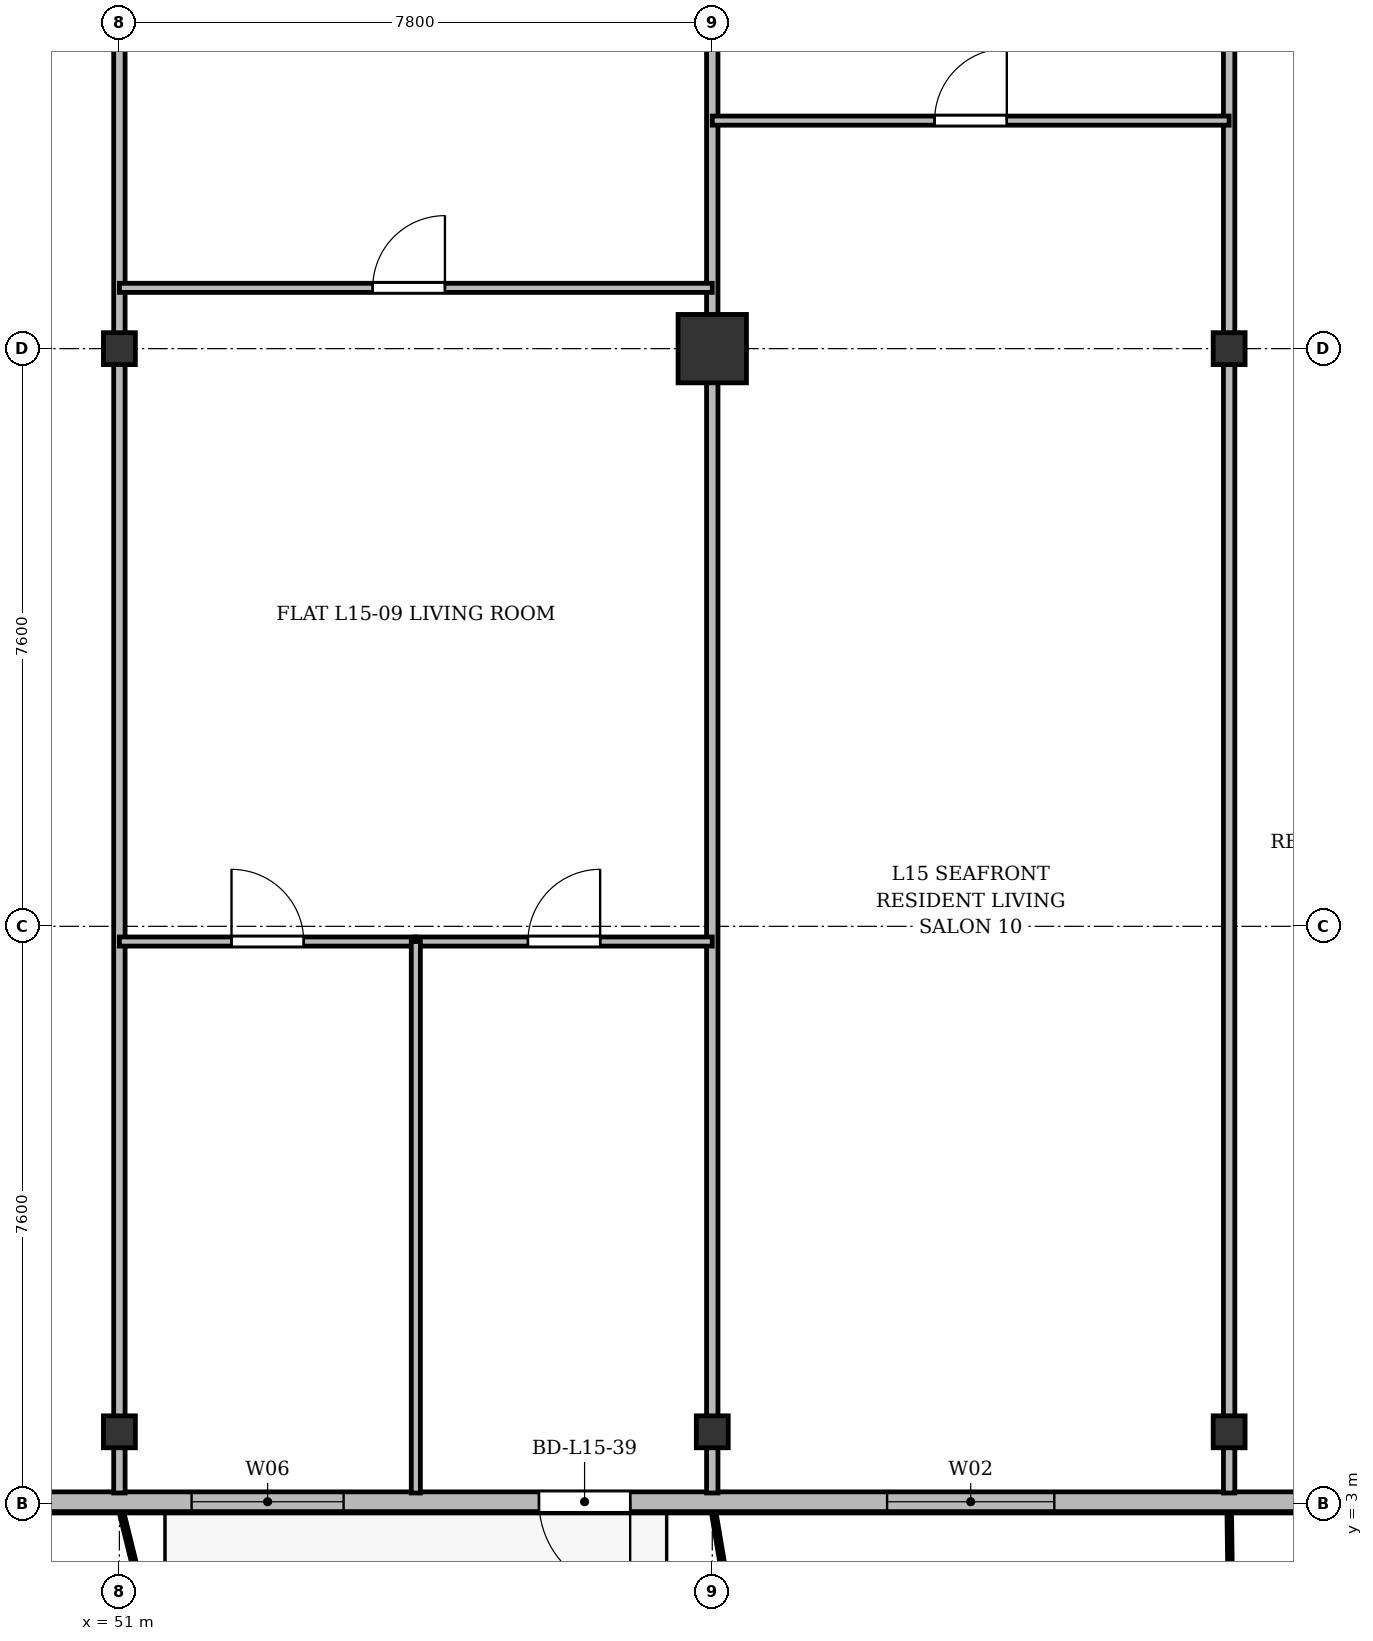
"""IFC4 building model, lengths in metres.
Left out: names, types, materials, properties, quantities, classifications, styles, units other than length and angle.
Written with IfcOpenShell. Run it as: python <this file> out.ifc"""

import sys

from ifc_helpers import new_model, si_unit, direction, frame, frame_2d, origin, origin_2d, place, context, subcontext, project, spatial, rectangle, i_section, extrude, source, transform, mapped, element, fill, save


model = new_model("IFC4")
c1 = context("Model", 3, precision=1e-05, world=origin(), true_north=direction((0.0, 1.0)))
c2 = subcontext(c1, "Body", "Model", "MODEL_VIEW")
j1 = project(units=[si_unit("LENGTHUNIT", "METRE"), si_unit("PLANEANGLEUNIT", "RADIAN")], contexts=[c1])
p1 = place(None, origin())
s1 = spatial("IfcSite", under=j1, at=p1, CompositionType="ELEMENT")
p2 = place(p1, origin())
s2 = spatial("IfcBuilding", under=s1, at=p2, CompositionType="ELEMENT")
p3 = place(p2, frame((0.0, 0.0, 59.5)))
s3 = spatial("IfcBuildingStorey", under=s2, at=p3, CompositionType="ELEMENT", Elevation=59.5)
m1 = source(origin(), c2, "Body", "SweptSolid", [
    extrude(i_section(OverallWidth=0.42, OverallDepth=0.42, WebThickness=0.026, FlangeThickness=0.04, at=origin_2d()), origin(), (0.0, 0.0, 1.0), 3.6),
])
for number, where, z_axis, x_axis in (
    (1, (51.0, 3.95, 0.0), (0.0, 0.0, 1.0), (1.0, 0.0, 0.0)),
    (2, (51.0, 18.2, 0.0), (0.0, 0.0, 1.0), (1.0, 0.0, 0.0)),
    (3, (58.8, 3.95, 0.0), (0.0, 0.0, 1.0), (1.0, 0.0, 0.0)),
):
    element("IfcColumn", number, at=place(p3, frame(where, z_axis=z_axis, x_axis=x_axis)), inside=s3, PredefinedType="COLUMN", context=c2, shape_type="MappedRepresentation", body=[
        mapped(m1, transform((0.0, 0.0, 0.0), x_axis=(1.0, 0.0, 0.0), y_axis=(0.0, 1.0, 0.0), z_axis=(0.0, 0.0, 1.0), scale=1.0)),
    ])
m2 = source(origin(), c2, "Body", "SweptSolid", [
    extrude(rectangle(XDim=0.9, YDim=0.9, at=origin_2d()), origin(), (0.0, 0.0, 1.0), 3.6),
])
p4 = place(p3, frame((58.8, 18.2, 0.0), z_axis=(0.0, 0.0, 1.0), x_axis=(1.0, 0.0, 0.0)))
e4 = element("IfcColumn", 4, at=p4, inside=s3, PredefinedType="COLUMN", context=c2, shape_type="MappedRepresentation", body=[
    mapped(m2, transform((0.0, 0.0, 0.0), x_axis=(1.0, 0.0, 0.0), y_axis=(0.0, 1.0, 0.0), z_axis=(0.0, 0.0, 1.0), scale=1.0)),
])
for number, where, z_axis, x_axis in (
    (5, (65.6, 3.95, 0.0), (0.0, 0.0, 1.0), (1.0, 0.0, 0.0)),
    (6, (65.6, 18.2, 0.0), (0.0, 0.0, 1.0), (1.0, 0.0, 0.0)),
):
    element("IfcColumn", number, at=place(p3, frame(where, z_axis=z_axis, x_axis=x_axis)), inside=s3, PredefinedType="COLUMN", context=c2, shape_type="MappedRepresentation", body=[
        mapped(m1, transform((0.0, 0.0, 0.0), x_axis=(1.0, 0.0, 0.0), y_axis=(0.0, 1.0, 0.0), z_axis=(0.0, 0.0, 1.0), scale=1.0)),
    ])
p5 = place(p3, frame((66.9, 3.03, 0.0), z_axis=(0.0, 0.0, 1.0), x_axis=(-1.0, 0.0, 0.0)))
e7 = element("IfcWall", 7, at=p5, inside=s3, PredefinedType="SOLIDWALL", context=c2, shape_type="SweptSolid", body=[
    extrude(rectangle(XDim=59.4, YDim=0.26, at=frame_2d((29.7, 0.0))), origin(), (0.0, 0.0, 1.0), 3.34),
])
p6 = place(p5, frame((3.6, 0.0, 0.9)))
e8 = element("IfcOpeningElement", 8, at=p6, cuts=e7, PredefinedType="OPENING", context=c2, shape_type="SweptSolid", body=[
    extrude(rectangle(XDim=2.2, YDim=1.8, at=frame_2d((1.1, 0.9))), frame((0.0, 0.14, 0.0), z_axis=(0.0, -1.0, 0.0), x_axis=(1.0, 0.0, 0.0)), (0.0, 0.0, 1.0), 0.28),
])
p7 = place(p5, frame((9.18, 0.0, 0.0)))
e9 = element("IfcOpeningElement", 9, at=p7, cuts=e7, PredefinedType="OPENING", context=c2, shape_type="SweptSolid", body=[
    extrude(rectangle(XDim=1.2, YDim=2.2, at=frame_2d((0.6, 1.1))), frame((0.0, 0.14, 0.0), z_axis=(0.0, -1.0, 0.0), x_axis=(1.0, 0.0, 0.0)), (0.0, 0.0, 1.0), 0.28),
])
p8 = place(p5, frame((12.95, 0.0, 0.9)))
e10 = element("IfcOpeningElement", 10, at=p8, cuts=e7, PredefinedType="OPENING", context=c2, shape_type="SweptSolid", body=[
    extrude(rectangle(XDim=2.0, YDim=1.95, at=frame_2d((1.0, 0.975))), frame((0.0, 0.14, 0.0), z_axis=(0.0, -1.0, 0.0), x_axis=(1.0, 0.0, 0.0)), (0.0, 0.0, 1.0), 0.28),
])
p9 = place(p5, frame((18.675, 0.0, 0.9)))
e11 = element("IfcOpeningElement", 11, at=p9, cuts=e7, PredefinedType="OPENING", context=c2, shape_type="SweptSolid", body=[
    extrude(rectangle(XDim=1.65, YDim=1.85, at=frame_2d((0.825, 0.925))), frame((0.0, 0.14, 0.0), z_axis=(0.0, -1.0, 0.0), x_axis=(1.0, 0.0, 0.0)), (0.0, 0.0, 1.0), 0.28),
])
p10 = place(p5, frame((24.1, 0.0, 0.9)))
e12 = element("IfcOpeningElement", 12, at=p10, cuts=e7, PredefinedType="OPENING", context=c2, shape_type="SweptSolid", body=[
    extrude(rectangle(XDim=1.8, YDim=1.8, at=frame_2d((0.9, 0.9))), frame((0.0, 0.14, 0.0), z_axis=(0.0, -1.0, 0.0), x_axis=(1.0, 0.0, 0.0)), (0.0, 0.0, 1.0), 0.28),
])
p11 = place(p5, frame((28.1, 0.0, 0.9)))
e13 = element("IfcOpeningElement", 13, at=p11, cuts=e7, PredefinedType="OPENING", context=c2, shape_type="SweptSolid", body=[
    extrude(rectangle(XDim=2.2, YDim=1.8, at=frame_2d((1.1, 0.9))), frame((0.0, 0.14, 0.0), z_axis=(0.0, -1.0, 0.0), x_axis=(1.0, 0.0, 0.0)), (0.0, 0.0, 1.0), 0.28),
])
p12 = place(p5, frame((33.15, 0.0, 0.9)))
e14 = element("IfcOpeningElement", 14, at=p12, cuts=e7, PredefinedType="OPENING", context=c2, shape_type="SweptSolid", body=[
    extrude(rectangle(XDim=1.5, YDim=1.75, at=frame_2d((0.75, 0.875))), frame((0.0, 0.14, 0.0), z_axis=(0.0, -1.0, 0.0), x_axis=(1.0, 0.0, 0.0)), (0.0, 0.0, 1.0), 0.28),
])
p13 = place(p5, frame((40.301, 0.0, 0.0)))
e15 = element("IfcOpeningElement", 15, at=p13, cuts=e7, PredefinedType="OPENING", context=c2, shape_type="SweptSolid", body=[
    extrude(rectangle(XDim=1.2, YDim=2.2, at=frame_2d((0.6, 1.1))), frame((0.0, 0.14, 0.0), z_axis=(0.0, -1.0, 0.0), x_axis=(1.0, 0.0, 0.0)), (0.0, 0.0, 1.0), 0.28),
])
p14 = place(p5, frame((46.575, 0.0, 0.9)))
e16 = element("IfcOpeningElement", 16, at=p14, cuts=e7, PredefinedType="OPENING", context=c2, shape_type="SweptSolid", body=[
    extrude(rectangle(XDim=1.65, YDim=1.85, at=frame_2d((0.825, 0.925))), frame((0.0, 0.14, 0.0), z_axis=(0.0, -1.0, 0.0), x_axis=(1.0, 0.0, 0.0)), (0.0, 0.0, 1.0), 0.28),
])
p15 = place(p5, frame((53.136, 0.0, 0.0)))
e17 = element("IfcOpeningElement", 17, at=p15, cuts=e7, PredefinedType="OPENING", context=c2, shape_type="SweptSolid", body=[
    extrude(rectangle(XDim=1.2, YDim=2.2, at=frame_2d((0.6, 1.1))), frame((0.0, 0.14, 0.0), z_axis=(0.0, -1.0, 0.0), x_axis=(1.0, 0.0, 0.0)), (0.0, 0.0, 1.0), 0.28),
])
p16 = place(p5, frame((55.3, 0.0, 0.9)))
e18 = element("IfcOpeningElement", 18, at=p16, cuts=e7, PredefinedType="OPENING", context=c2, shape_type="SweptSolid", body=[
    extrude(rectangle(XDim=2.2, YDim=1.8, at=frame_2d((1.1, 0.9))), frame((0.0, 0.14, 0.0), z_axis=(0.0, -1.0, 0.0), x_axis=(1.0, 0.0, 0.0)), (0.0, 0.0, 1.0), 0.28),
])
for number, where, z_axis, x_axis in (
    (19, (51.0, 3.145, 0.0), (0.0, 0.0, 1.0), (0.0, 1.0, 0.0)),
    (20, (58.8, 3.145, 0.0), (0.0, 0.0, 1.0), (0.0, 1.0, 0.0)),
    (21, (65.6, 3.145, 0.0), (0.0, 0.0, 1.0), (0.0, 1.0, 0.0)),
):
    element("IfcWall", number, at=place(p3, frame(where, z_axis=z_axis, x_axis=x_axis)), inside=s3, PredefinedType="PARTITIONING", context=c2, shape_type="SweptSolid", body=[
        extrude(rectangle(XDim=24.455, YDim=0.15, at=frame_2d((12.228, 0.0))), origin(), (0.0, 0.0, 1.0), 2.752),
    ])
p17 = place(p3, frame((51.0, 19.0, 0.0), z_axis=(0.0, 0.0, 1.0), x_axis=(1.0, 0.0, 0.0)))
e22 = element("IfcWall", 22, at=p17, inside=s3, PredefinedType="PARTITIONING", context=c2, shape_type="SweptSolid", body=[
    extrude(rectangle(XDim=7.8, YDim=0.12, at=frame_2d((3.9, 0.0))), origin(), (0.0, 0.0, 1.0), 2.752),
])
p18 = place(p17, frame((3.333, 0.0, 0.0)))
e23 = element("IfcOpeningElement", 23, at=p18, cuts=e22, PredefinedType="OPENING", context=c2, shape_type="SweptSolid", body=[
    extrude(rectangle(XDim=0.95, YDim=2.15, at=frame_2d((0.475, 1.075))), frame((0.0, 0.07, 0.0), z_axis=(0.0, -1.0, 0.0), x_axis=(1.0, 0.0, 0.0)), (0.0, 0.0, 1.0), 0.14),
])
p19 = place(p3, frame((51.0, 10.4, 0.0), z_axis=(0.0, 0.0, 1.0), x_axis=(1.0, 0.0, 0.0)))
e24 = element("IfcWall", 24, at=p19, inside=s3, PredefinedType="PARTITIONING", context=c2, shape_type="SweptSolid", body=[
    extrude(rectangle(XDim=3.9, YDim=0.12, at=frame_2d((1.95, 0.0))), origin(), (0.0, 0.0, 1.0), 2.752),
])
p20 = place(p19, frame((1.475, 0.0, 0.0)))
e25 = element("IfcOpeningElement", 25, at=p20, cuts=e24, PredefinedType="OPENING", context=c2, shape_type="SweptSolid", body=[
    extrude(rectangle(XDim=0.95, YDim=2.15, at=frame_2d((0.475, 1.075))), frame((0.0, 0.07, 0.0), z_axis=(0.0, -1.0, 0.0), x_axis=(1.0, 0.0, 0.0)), (0.0, 0.0, 1.0), 0.14),
])
p21 = place(p3, frame((54.9, 10.4, 0.0), z_axis=(0.0, 0.0, 1.0), x_axis=(1.0, 0.0, 0.0)))
e26 = element("IfcWall", 26, at=p21, inside=s3, PredefinedType="PARTITIONING", context=c2, shape_type="SweptSolid", body=[
    extrude(rectangle(XDim=3.9, YDim=0.12, at=frame_2d((1.95, 0.0))), origin(), (0.0, 0.0, 1.0), 2.752),
])
p22 = place(p21, frame((1.475, 0.0, 0.0)))
e27 = element("IfcOpeningElement", 27, at=p22, cuts=e26, PredefinedType="OPENING", context=c2, shape_type="SweptSolid", body=[
    extrude(rectangle(XDim=0.95, YDim=2.15, at=frame_2d((0.475, 1.075))), frame((0.0, 0.07, 0.0), z_axis=(0.0, -1.0, 0.0), x_axis=(1.0, 0.0, 0.0)), (0.0, 0.0, 1.0), 0.14),
])
p23 = place(p3, frame((54.9, 3.145, 0.0), z_axis=(0.0, 0.0, 1.0), x_axis=(0.0, 1.0, 0.0)))
e28 = element("IfcWall", 28, at=p23, inside=s3, PredefinedType="PARTITIONING", context=c2, shape_type="SweptSolid", body=[
    extrude(rectangle(XDim=7.255, YDim=0.12, at=frame_2d((3.627, 0.0))), origin(), (0.0, 0.0, 1.0), 2.69),
])
p24 = place(p3, frame((58.8, 21.2, 0.0), z_axis=(0.0, 0.0, 1.0), x_axis=(1.0, 0.0, 0.0)))
e29 = element("IfcWall", 29, at=p24, inside=s3, PredefinedType="PARTITIONING", context=c2, shape_type="SweptSolid", body=[
    extrude(rectangle(XDim=6.8, YDim=0.12, at=frame_2d((3.4, 0.0))), origin(), (0.0, 0.0, 1.0), 2.752),
])
p25 = place(p24, frame((2.925, 0.0, 0.0)))
e30 = element("IfcOpeningElement", 30, at=p25, cuts=e29, PredefinedType="OPENING", context=c2, shape_type="SweptSolid", body=[
    extrude(rectangle(XDim=0.95, YDim=2.15, at=frame_2d((0.475, 1.075))), frame((0.0, 0.07, 0.0), z_axis=(0.0, -1.0, 0.0), x_axis=(1.0, 0.0, 0.0)), (0.0, 0.0, 1.0), 0.14),
])
m3 = source(origin(), c2, "Body", "SweptSolid", [
    extrude(rectangle(XDim=2.2, YDim=1.8, at=frame_2d((1.1, 0.9))), frame((0.0, 0.03, 0.0), z_axis=(0.0, -1.0, 0.0), x_axis=(1.0, 0.0, 0.0)), (0.0, 0.0, 1.0), 0.06),
])
p26 = place(p6, origin())
e31 = element("IfcWindow", 31, at=p26, inside=s3, PartitioningType="SINGLE_PANEL", PredefinedType="WINDOW", context=c2, shape_type="MappedRepresentation", body=[
    mapped(m3, transform((0.0, 0.0, 0.0), x_axis=(1.0, 0.0, 0.0), y_axis=(0.0, 1.0, 0.0), z_axis=(0.0, 0.0, 1.0), scale=1.0)),
])
fill(e8, e31)
m4 = source(origin(), c2, "Body", "SweptSolid", [
    extrude(rectangle(XDim=1.2, YDim=2.2, at=frame_2d((0.6, 1.1))), frame((0.0, 0.025, 0.0), z_axis=(0.0, -1.0, 0.0), x_axis=(1.0, 0.0, 0.0)), (0.0, 0.0, 1.0), 0.05),
])
p27 = place(p7, origin())
e32 = element("IfcDoor", 32, at=p27, inside=s3, OperationType="SINGLE_SWING_LEFT", PredefinedType="DOOR", context=c2, shape_type="MappedRepresentation", body=[
    mapped(m4, transform((0.0, 0.0, 0.0), x_axis=(1.0, 0.0, 0.0), y_axis=(0.0, 1.0, 0.0), z_axis=(0.0, 0.0, 1.0), scale=1.0)),
])
fill(e9, e32)
m5 = source(origin(), c2, "Body", "SweptSolid", [
    extrude(rectangle(XDim=2.0, YDim=1.95, at=frame_2d((1.0, 0.975))), frame((0.0, 0.03, 0.0), z_axis=(0.0, -1.0, 0.0), x_axis=(1.0, 0.0, 0.0)), (0.0, 0.0, 1.0), 0.06),
])
p28 = place(p8, origin())
e33 = element("IfcWindow", 33, at=p28, inside=s3, PartitioningType="SINGLE_PANEL", PredefinedType="WINDOW", context=c2, shape_type="MappedRepresentation", body=[
    mapped(m5, transform((0.0, 0.0, 0.0), x_axis=(1.0, 0.0, 0.0), y_axis=(0.0, 1.0, 0.0), z_axis=(0.0, 0.0, 1.0), scale=1.0)),
])
fill(e10, e33)
m6 = source(origin(), c2, "Body", "SweptSolid", [
    extrude(rectangle(XDim=0.95, YDim=2.15, at=frame_2d((0.475, 1.075))), frame((0.0, 0.025, 0.0), z_axis=(0.0, -1.0, 0.0), x_axis=(1.0, 0.0, 0.0)), (0.0, 0.0, 1.0), 0.05),
])
p29 = place(p18, origin())
e34 = element("IfcDoor", 34, at=p29, inside=s3, OperationType="SINGLE_SWING_RIGHT", PredefinedType="DOOR", context=c2, shape_type="MappedRepresentation", body=[
    mapped(m6, transform((0.0, 0.0, 0.0), x_axis=(1.0, 0.0, 0.0), y_axis=(0.0, 1.0, 0.0), z_axis=(0.0, 0.0, 1.0), scale=1.0)),
])
fill(e23, e34)
p30 = place(p20, origin())
e35 = element("IfcDoor", 35, at=p30, inside=s3, OperationType="SINGLE_SWING_LEFT", PredefinedType="DOOR", context=c2, shape_type="MappedRepresentation", body=[
    mapped(m6, transform((0.0, 0.0, 0.0), x_axis=(1.0, 0.0, 0.0), y_axis=(0.0, 1.0, 0.0), z_axis=(0.0, 0.0, 1.0), scale=1.0)),
])
fill(e25, e35)
p31 = place(p22, origin())
e36 = element("IfcDoor", 36, at=p31, inside=s3, OperationType="SINGLE_SWING_RIGHT", PredefinedType="DOOR", context=c2, shape_type="MappedRepresentation", body=[
    mapped(m6, transform((0.0, 0.0, 0.0), x_axis=(1.0, 0.0, 0.0), y_axis=(0.0, 1.0, 0.0), z_axis=(0.0, 0.0, 1.0), scale=1.0)),
])
fill(e27, e36)
p32 = place(p25, origin())
e37 = element("IfcDoor", 37, at=p32, inside=s3, OperationType="SINGLE_SWING_RIGHT", PredefinedType="DOOR", context=c2, shape_type="MappedRepresentation", body=[
    mapped(m6, transform((0.0, 0.0, 0.0), x_axis=(1.0, 0.0, 0.0), y_axis=(0.0, 1.0, 0.0), z_axis=(0.0, 0.0, 1.0), scale=1.0)),
])
fill(e30, e37)
save(model, sys.argv[1])
